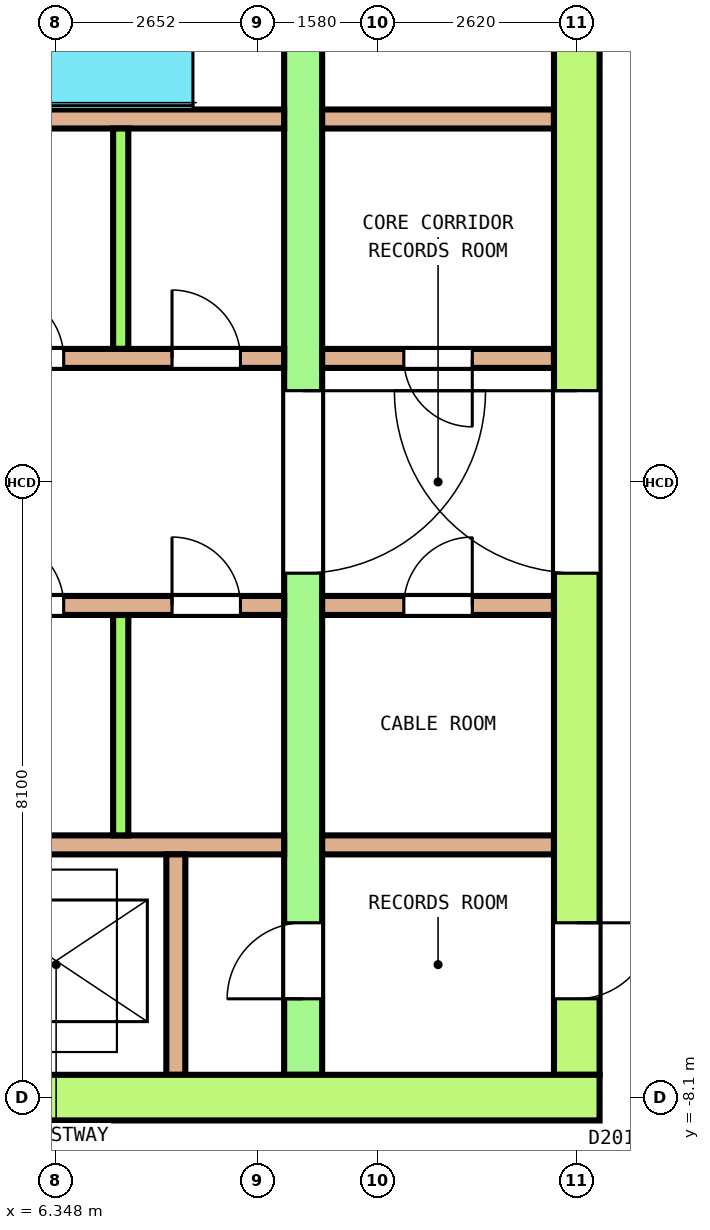
"""IFC4 building model, lengths in metres.
Left out: names, types, materials, properties, quantities, classifications, styles, units other than length and angle.
Written with IfcOpenShell. Run it as: python <this file> out.ifc"""

import sys

from ifc_helpers import new_model, si_unit, direction, frame, frame_2d, origin, place, context, subcontext, project, spatial, polyline, rectangle, outline, extrude, element, fill, save


model = new_model("IFC4")
c1 = context("Model", 3, precision=1e-05, world=origin(), true_north=direction((0.0, 1.0)))
c2 = subcontext(c1, "Body", "Model", "MODEL_VIEW")
j1 = project(units=[si_unit("LENGTHUNIT", "METRE"), si_unit("PLANEANGLEUNIT", "RADIAN")], contexts=[c1])
p1 = place(None, origin())
s1 = spatial("IfcSite", under=j1, at=p1, CompositionType="ELEMENT")
p2 = place(p1, origin())
s2 = spatial("IfcBuilding", under=s1, at=p2, CompositionType="ELEMENT")
p3 = place(p2, frame((0.0, 0.0, 237.4)))
s3 = spatial("IfcBuildingStorey", under=s2, at=p3, CompositionType="ELEMENT", Elevation=237.4)
p4 = place(p3, frame((13.66, -19.141, 0.0), z_axis=(0.0, 0.0, 1.0), x_axis=(0.500001086243, 0.866024776641, 0.0)))
e1 = element("IfcWall", 1, at=p4, inside=s3, PredefinedType="SOLIDWALL", context=c2, shape_type="SweptSolid", body=[
    extrude(outline(polyline([(-0.027, -0.1), (1.002, -0.1), (2.031, -0.1), (3.059, -0.1), (4.088, -0.1), (5.117, -0.1), (6.146, -0.1), (7.175, -0.1), (8.203, -0.1), (9.232, -0.1), (10.261, -0.1), (11.29, -0.1), (12.318, -0.1), (13.347, -0.1), (14.376, -0.1), (15.405, -0.1), (16.433, -0.1), (17.462, -0.1), (18.491, -0.1), (19.52, -0.1), (19.466, 0.1), (18.443, 0.1), (17.42, 0.1), (16.396, 0.1), (15.373, 0.1), (14.35, 0.1), (13.327, 0.1), (12.304, 0.1), (11.281, 0.1), (10.258, 0.1), (9.235, 0.1), (8.212, 0.1), (7.188, 0.1), (6.166, 0.1), (5.142, 0.1), (4.119, 0.1), (3.096, 0.1), (2.073, 0.1), (1.05, 0.1), (0.027, 0.1), (-0.027, -0.1)])), origin(), (0.0, 0.0, 1.0), 3.7),
])
p5 = place(p4, frame((0.499, 0.0, 0.1)))
e2 = element("IfcOpeningElement", 2, at=p5, cuts=e1, PredefinedType="OPENING", context=c2, shape_type="SweptSolid", body=[
    extrude(rectangle(XDim=2.9, YDim=2.65, at=frame_2d((1.45, 1.325))), frame((0.0, 0.11, 0.0), z_axis=(0.0, -1.0, 0.0), x_axis=(1.0, 0.0, 0.0)), (0.0, 0.0, 1.0), 0.22),
])
p6 = place(p4, frame((4.398, 0.0, 0.1)))
e3 = element("IfcOpeningElement", 3, at=p6, cuts=e1, PredefinedType="OPENING", context=c2, shape_type="SweptSolid", body=[
    extrude(rectangle(XDim=2.9, YDim=2.65, at=frame_2d((1.45, 1.325))), frame((0.0, 0.11, 0.0), z_axis=(0.0, -1.0, 0.0), x_axis=(1.0, 0.0, 0.0)), (0.0, 0.0, 1.0), 0.22),
])
p7 = place(p4, frame((8.846, 0.0, 0.0)))
e4 = element("IfcOpeningElement", 4, at=p7, cuts=e1, PredefinedType="OPENING", context=c2, shape_type="SweptSolid", body=[
    extrude(rectangle(XDim=1.8, YDim=2.4, at=frame_2d((0.9, 1.2))), frame((0.0, 0.11, 0.0), z_axis=(0.0, -1.0, 0.0), x_axis=(1.0, 0.0, 0.0)), (0.0, 0.0, 1.0), 0.22),
])
p8 = place(p4, frame((8.846, 0.0, 2.55)))
e5 = element("IfcOpeningElement", 5, at=p8, cuts=e1, PredefinedType="OPENING", context=c2, shape_type="SweptSolid", body=[
    extrude(rectangle(XDim=1.8, YDim=0.2, at=frame_2d((0.9, 0.1))), frame((0.0, 0.11, 0.0), z_axis=(0.0, -1.0, 0.0), x_axis=(1.0, 0.0, 0.0)), (0.0, 0.0, 1.0), 0.22),
])
p9 = place(p4, frame((12.195, 0.0, 0.1)))
e6 = element("IfcOpeningElement", 6, at=p9, cuts=e1, PredefinedType="OPENING", context=c2, shape_type="SweptSolid", body=[
    extrude(rectangle(XDim=2.9, YDim=2.65, at=frame_2d((1.45, 1.325))), frame((0.0, 0.11, 0.0), z_axis=(0.0, -1.0, 0.0), x_axis=(1.0, 0.0, 0.0)), (0.0, 0.0, 1.0), 0.22),
])
p10 = place(p4, frame((16.094, 0.0, 0.1)))
e7 = element("IfcOpeningElement", 7, at=p10, cuts=e1, PredefinedType="OPENING", context=c2, shape_type="SweptSolid", body=[
    extrude(rectangle(XDim=2.9, YDim=2.65, at=frame_2d((1.45, 1.325))), frame((0.0, 0.11, 0.0), z_axis=(0.0, -1.0, 0.0), x_axis=(1.0, 0.0, 0.0)), (0.0, 0.0, 1.0), 0.22),
])
p11 = place(p3, frame((-13.5, -8.1, 0.0), z_axis=(0.0, 0.0, 1.0), x_axis=(1.0, 0.0, 0.0)))
e8 = element("IfcWall", 8, at=p11, inside=s3, PredefinedType="SHEAR", context=c2, shape_type="SweptSolid", body=[
    extrude(rectangle(XDim=27.0, YDim=0.6, at=frame_2d((13.5, 0.0))), origin(), (0.0, 0.0, 1.0), 3.7),
])
p12 = place(p11, frame((15.05, 0.0, 0.0)))
e9 = element("IfcOpeningElement", 9, at=p12, cuts=e8, PredefinedType="OPENING", context=c2, shape_type="SweptSolid", body=[
    extrude(rectangle(XDim=1.2, YDim=2.1, at=frame_2d((0.6, 1.05))), frame((0.0, 0.31, 0.0), z_axis=(0.0, -1.0, 0.0), x_axis=(1.0, 0.0, 0.0)), (0.0, 0.0, 1.0), 0.62),
])
p13 = place(p3, frame((13.2, -7.8, 0.0), z_axis=(0.0, 0.0, 1.0), x_axis=(0.0, 1.0, 0.0)))
e10 = element("IfcWall", 10, at=p13, inside=s3, PredefinedType="SHEAR", context=c2, shape_type="SweptSolid", body=[
    extrude(rectangle(XDim=15.6, YDim=0.6, at=frame_2d((7.8, 0.0))), origin(), (0.0, 0.0, 1.0), 3.7),
])
p14 = place(p13, frame((6.6, 0.0, 0.0)))
e11 = element("IfcOpeningElement", 11, at=p14, cuts=e10, PredefinedType="OPENING", context=c2, shape_type="SweptSolid", body=[
    extrude(rectangle(XDim=2.4, YDim=2.1, at=frame_2d((1.2, 1.05))), frame((0.0, 0.31, 0.0), z_axis=(0.0, -1.0, 0.0), x_axis=(1.0, 0.0, 0.0)), (0.0, 0.0, 1.0), 0.62),
])
p15 = place(p13, frame((13.5, 0.0, 0.0)))
e12 = element("IfcOpeningElement", 12, at=p15, cuts=e10, PredefinedType="OPENING", context=c2, shape_type="SweptSolid", body=[
    extrude(rectangle(XDim=1.2, YDim=2.1, at=frame_2d((0.6, 1.05))), frame((0.0, 0.31, 0.0), z_axis=(0.0, -1.0, 0.0), x_axis=(1.0, 0.0, 0.0)), (0.0, 0.0, 1.0), 0.62),
])
p16 = place(p13, frame((1.0, 0.0, 0.0)))
e13 = element("IfcOpeningElement", 13, at=p16, cuts=e10, PredefinedType="OPENING", context=c2, shape_type="SweptSolid", body=[
    extrude(rectangle(XDim=1.0, YDim=2.1, at=frame_2d((0.5, 1.05))), frame((0.0, 0.31, 0.0), z_axis=(0.0, -1.0, 0.0), x_axis=(1.0, 0.0, 0.0)), (0.0, 0.0, 1.0), 0.62),
])
p17 = place(p3, frame((9.6, -7.8, 0.0), z_axis=(0.0, 0.0, 1.0), x_axis=(0.0, 1.0, 0.0)))
e14 = element("IfcWall", 14, at=p17, inside=s3, PredefinedType="SHEAR", context=c2, shape_type="SweptSolid", body=[
    extrude(rectangle(XDim=15.6, YDim=0.5, at=frame_2d((7.8, 0.0))), origin(), (0.0, 0.0, 1.0), 3.7),
])
p18 = place(p17, frame((6.6, 0.0, 0.0)))
e15 = element("IfcOpeningElement", 15, at=p18, cuts=e14, PredefinedType="OPENING", context=c2, shape_type="SweptSolid", body=[
    extrude(rectangle(XDim=2.4, YDim=2.1, at=frame_2d((1.2, 1.05))), frame((0.0, 0.26, 0.0), z_axis=(0.0, -1.0, 0.0), x_axis=(1.0, 0.0, 0.0)), (0.0, 0.0, 1.0), 0.52),
])
p19 = place(p17, frame((13.5, 0.0, 0.0)))
e16 = element("IfcOpeningElement", 16, at=p19, cuts=e14, PredefinedType="OPENING", context=c2, shape_type="SweptSolid", body=[
    extrude(rectangle(XDim=1.2, YDim=2.1, at=frame_2d((0.6, 1.05))), frame((0.0, 0.26, 0.0), z_axis=(0.0, -1.0, 0.0), x_axis=(1.0, 0.0, 0.0)), (0.0, 0.0, 1.0), 0.52),
])
p20 = place(p17, frame((1.0, 0.0, 0.0)))
e17 = element("IfcOpeningElement", 17, at=p20, cuts=e14, PredefinedType="OPENING", context=c2, shape_type="SweptSolid", body=[
    extrude(rectangle(XDim=1.0, YDim=2.1, at=frame_2d((0.5, 1.05))), frame((0.0, 0.26, 0.0), z_axis=(0.0, -1.0, 0.0), x_axis=(1.0, 0.0, 0.0)), (0.0, 0.0, 1.0), 0.52),
])
p21 = place(p3, frame((-9.35, 1.625, 0.0), z_axis=(0.0, 0.0, 1.0), x_axis=(1.0, 0.0, 0.0)))
e18 = element("IfcWall", 18, at=p21, inside=s3, PredefinedType="SOLIDWALL", context=c2, shape_type="SweptSolid", body=[
    extrude(rectangle(XDim=18.7, YDim=0.25, at=frame_2d((9.35, 0.0))), origin(), (0.0, 0.0, 1.0), 3.7),
])
p22 = place(p21, frame((7.65, 0.0, 0.0)))
e19 = element("IfcOpeningElement", 19, at=p22, cuts=e18, PredefinedType="OPENING", context=c2, shape_type="SweptSolid", body=[
    extrude(rectangle(XDim=1.1, YDim=2.1, at=frame_2d((0.55, 1.05))), frame((0.0, 0.135, 0.0), z_axis=(0.0, -1.0, 0.0), x_axis=(1.0, 0.0, 0.0)), (0.0, 0.0, 1.0), 0.27),
])
p23 = place(p21, frame((9.95, 0.0, 0.0)))
e20 = element("IfcOpeningElement", 20, at=p23, cuts=e18, PredefinedType="OPENING", context=c2, shape_type="SweptSolid", body=[
    extrude(rectangle(XDim=1.1, YDim=2.1, at=frame_2d((0.55, 1.05))), frame((0.0, 0.135, 0.0), z_axis=(0.0, -1.0, 0.0), x_axis=(1.0, 0.0, 0.0)), (0.0, 0.0, 1.0), 0.27),
])
p24 = place(p21, frame((12.4, 0.0, 0.0)))
e21 = element("IfcOpeningElement", 21, at=p24, cuts=e18, PredefinedType="OPENING", context=c2, shape_type="SweptSolid", body=[
    extrude(rectangle(XDim=1.1, YDim=2.1, at=frame_2d((0.55, 1.05))), frame((0.0, 0.135, 0.0), z_axis=(0.0, -1.0, 0.0), x_axis=(1.0, 0.0, 0.0)), (0.0, 0.0, 1.0), 0.27),
])
p25 = place(p21, frame((0.575, 0.0, 0.0)))
e22 = element("IfcOpeningElement", 22, at=p25, cuts=e18, PredefinedType="OPENING", context=c2, shape_type="SweptSolid", body=[
    extrude(rectangle(XDim=0.9, YDim=2.1, at=frame_2d((0.45, 1.05))), frame((0.0, 0.135, 0.0), z_axis=(0.0, -1.0, 0.0), x_axis=(1.0, 0.0, 0.0)), (0.0, 0.0, 1.0), 0.27),
])
p26 = place(p21, frame((2.919, 0.0, 0.0)))
e23 = element("IfcOpeningElement", 23, at=p26, cuts=e18, PredefinedType="OPENING", context=c2, shape_type="SweptSolid", body=[
    extrude(rectangle(XDim=0.9, YDim=2.1, at=frame_2d((0.45, 1.05))), frame((0.0, 0.135, 0.0), z_axis=(0.0, -1.0, 0.0), x_axis=(1.0, 0.0, 0.0)), (0.0, 0.0, 1.0), 0.27),
])
p27 = place(p21, frame((5.281, 0.0, 0.0)))
e24 = element("IfcOpeningElement", 24, at=p27, cuts=e18, PredefinedType="OPENING", context=c2, shape_type="SweptSolid", body=[
    extrude(rectangle(XDim=0.9, YDim=2.1, at=frame_2d((0.45, 1.05))), frame((0.0, 0.135, 0.0), z_axis=(0.0, -1.0, 0.0), x_axis=(1.0, 0.0, 0.0)), (0.0, 0.0, 1.0), 0.27),
])
p28 = place(p21, frame((14.9, 0.0, 0.0)))
e25 = element("IfcOpeningElement", 25, at=p28, cuts=e18, PredefinedType="OPENING", context=c2, shape_type="SweptSolid", body=[
    extrude(rectangle(XDim=0.9, YDim=2.1, at=frame_2d((0.45, 1.05))), frame((0.0, 0.135, 0.0), z_axis=(0.0, -1.0, 0.0), x_axis=(1.0, 0.0, 0.0)), (0.0, 0.0, 1.0), 0.27),
])
p29 = place(p21, frame((17.225, 0.0, 0.0)))
e26 = element("IfcOpeningElement", 26, at=p29, cuts=e18, PredefinedType="OPENING", context=c2, shape_type="SweptSolid", body=[
    extrude(rectangle(XDim=0.9, YDim=2.1, at=frame_2d((0.45, 1.05))), frame((0.0, 0.135, 0.0), z_axis=(0.0, -1.0, 0.0), x_axis=(1.0, 0.0, 0.0)), (0.0, 0.0, 1.0), 0.27),
])
p30 = place(p3, frame((9.85, 1.625, 0.0), z_axis=(0.0, 0.0, 1.0), x_axis=(1.0, 0.0, 0.0)))
e27 = element("IfcWall", 27, at=p30, inside=s3, PredefinedType="SOLIDWALL", context=c2, shape_type="SweptSolid", body=[
    extrude(rectangle(XDim=3.05, YDim=0.25, at=frame_2d((1.525, 0.0))), origin(), (0.0, 0.0, 1.0), 3.7),
])
p31 = place(p30, frame((1.075, 0.0, 0.0)))
e28 = element("IfcOpeningElement", 28, at=p31, cuts=e27, PredefinedType="OPENING", context=c2, shape_type="SweptSolid", body=[
    extrude(rectangle(XDim=0.9, YDim=2.1, at=frame_2d((0.45, 1.05))), frame((0.0, 0.135, 0.0), z_axis=(0.0, -1.0, 0.0), x_axis=(1.0, 0.0, 0.0)), (0.0, 0.0, 1.0), 0.27),
])
p32 = place(p3, frame((-9.35, 4.775, 0.0), z_axis=(0.0, 0.0, 1.0), x_axis=(1.0, 0.0, 0.0)))
e29 = element("IfcWall", 29, at=p32, inside=s3, PredefinedType="SOLIDWALL", context=c2, shape_type="SweptSolid", body=[
    extrude(rectangle(XDim=18.7, YDim=0.25, at=frame_2d((9.35, 0.0))), origin(), (0.0, 0.0, 1.0), 3.7),
])
p33 = place(p3, frame((9.85, 4.775, 0.0), z_axis=(0.0, 0.0, 1.0), x_axis=(1.0, 0.0, 0.0)))
e30 = element("IfcWall", 30, at=p33, inside=s3, PredefinedType="SOLIDWALL", context=c2, shape_type="SweptSolid", body=[
    extrude(rectangle(XDim=3.05, YDim=0.25, at=frame_2d((1.525, 0.0))), origin(), (0.0, 0.0, 1.0), 3.7),
])
p34 = place(p3, frame((7.2, 1.75, 0.0), z_axis=(0.0, 0.0, 1.0), x_axis=(0.0, 1.0, 0.0)))
e31 = element("IfcWall", 31, at=p34, inside=s3, PredefinedType="SOLIDWALL", context=c2, shape_type="SweptSolid", body=[
    extrude(rectangle(XDim=2.9, YDim=0.2, at=frame_2d((1.45, 0.0))), origin(), (0.0, 0.0, 1.0), 3.7),
])
p35 = place(p3, frame((-9.35, -1.625, 0.0), z_axis=(0.0, 0.0, 1.0), x_axis=(1.0, 0.0, 0.0)))
e32 = element("IfcWall", 32, at=p35, inside=s3, PredefinedType="SOLIDWALL", context=c2, shape_type="SweptSolid", body=[
    extrude(rectangle(XDim=18.7, YDim=0.25, at=frame_2d((9.35, 0.0))), origin(), (0.0, 0.0, 1.0), 3.7),
])
p36 = place(p35, frame((7.65, 0.0, 0.0)))
e33 = element("IfcOpeningElement", 33, at=p36, cuts=e32, PredefinedType="OPENING", context=c2, shape_type="SweptSolid", body=[
    extrude(rectangle(XDim=1.1, YDim=2.1, at=frame_2d((0.55, 1.05))), frame((0.0, 0.135, 0.0), z_axis=(0.0, -1.0, 0.0), x_axis=(1.0, 0.0, 0.0)), (0.0, 0.0, 1.0), 0.27),
])
p37 = place(p35, frame((9.95, 0.0, 0.0)))
e34 = element("IfcOpeningElement", 34, at=p37, cuts=e32, PredefinedType="OPENING", context=c2, shape_type="SweptSolid", body=[
    extrude(rectangle(XDim=1.1, YDim=2.1, at=frame_2d((0.55, 1.05))), frame((0.0, 0.135, 0.0), z_axis=(0.0, -1.0, 0.0), x_axis=(1.0, 0.0, 0.0)), (0.0, 0.0, 1.0), 0.27),
])
p38 = place(p35, frame((12.4, 0.0, 0.0)))
e35 = element("IfcOpeningElement", 35, at=p38, cuts=e32, PredefinedType="OPENING", context=c2, shape_type="SweptSolid", body=[
    extrude(rectangle(XDim=1.1, YDim=2.1, at=frame_2d((0.55, 1.05))), frame((0.0, 0.135, 0.0), z_axis=(0.0, -1.0, 0.0), x_axis=(1.0, 0.0, 0.0)), (0.0, 0.0, 1.0), 0.27),
])
p39 = place(p35, frame((0.575, 0.0, 0.0)))
e36 = element("IfcOpeningElement", 36, at=p39, cuts=e32, PredefinedType="OPENING", context=c2, shape_type="SweptSolid", body=[
    extrude(rectangle(XDim=0.9, YDim=2.1, at=frame_2d((0.45, 1.05))), frame((0.0, 0.135, 0.0), z_axis=(0.0, -1.0, 0.0), x_axis=(1.0, 0.0, 0.0)), (0.0, 0.0, 1.0), 0.27),
])
p40 = place(p35, frame((2.519, 0.0, 0.0)))
e37 = element("IfcOpeningElement", 37, at=p40, cuts=e32, PredefinedType="OPENING", context=c2, shape_type="SweptSolid", body=[
    extrude(rectangle(XDim=0.9, YDim=2.1, at=frame_2d((0.45, 1.05))), frame((0.0, 0.135, 0.0), z_axis=(0.0, -1.0, 0.0), x_axis=(1.0, 0.0, 0.0)), (0.0, 0.0, 1.0), 0.27),
])
p41 = place(p35, frame((4.881, 0.0, 0.0)))
e38 = element("IfcOpeningElement", 38, at=p41, cuts=e32, PredefinedType="OPENING", context=c2, shape_type="SweptSolid", body=[
    extrude(rectangle(XDim=0.9, YDim=2.1, at=frame_2d((0.45, 1.05))), frame((0.0, 0.135, 0.0), z_axis=(0.0, -1.0, 0.0), x_axis=(1.0, 0.0, 0.0)), (0.0, 0.0, 1.0), 0.27),
])
p42 = place(p35, frame((14.9, 0.0, 0.0)))
e39 = element("IfcOpeningElement", 39, at=p42, cuts=e32, PredefinedType="OPENING", context=c2, shape_type="SweptSolid", body=[
    extrude(rectangle(XDim=0.9, YDim=2.1, at=frame_2d((0.45, 1.05))), frame((0.0, 0.135, 0.0), z_axis=(0.0, -1.0, 0.0), x_axis=(1.0, 0.0, 0.0)), (0.0, 0.0, 1.0), 0.27),
])
p43 = place(p35, frame((17.225, 0.0, 0.0)))
e40 = element("IfcOpeningElement", 40, at=p43, cuts=e32, PredefinedType="OPENING", context=c2, shape_type="SweptSolid", body=[
    extrude(rectangle(XDim=0.9, YDim=2.1, at=frame_2d((0.45, 1.05))), frame((0.0, 0.135, 0.0), z_axis=(0.0, -1.0, 0.0), x_axis=(1.0, 0.0, 0.0)), (0.0, 0.0, 1.0), 0.27),
])
p44 = place(p3, frame((9.85, -1.625, 0.0), z_axis=(0.0, 0.0, 1.0), x_axis=(1.0, 0.0, 0.0)))
e41 = element("IfcWall", 41, at=p44, inside=s3, PredefinedType="SOLIDWALL", context=c2, shape_type="SweptSolid", body=[
    extrude(rectangle(XDim=3.05, YDim=0.25, at=frame_2d((1.525, 0.0))), origin(), (0.0, 0.0, 1.0), 3.7),
])
p45 = place(p44, frame((1.075, 0.0, 0.0)))
e42 = element("IfcOpeningElement", 42, at=p45, cuts=e41, PredefinedType="OPENING", context=c2, shape_type="SweptSolid", body=[
    extrude(rectangle(XDim=0.9, YDim=2.1, at=frame_2d((0.45, 1.05))), frame((0.0, 0.135, 0.0), z_axis=(0.0, -1.0, 0.0), x_axis=(1.0, 0.0, 0.0)), (0.0, 0.0, 1.0), 0.27),
])
p46 = place(p3, frame((-9.35, -4.775, 0.0), z_axis=(0.0, 0.0, 1.0), x_axis=(1.0, 0.0, 0.0)))
e43 = element("IfcWall", 43, at=p46, inside=s3, PredefinedType="SOLIDWALL", context=c2, shape_type="SweptSolid", body=[
    extrude(rectangle(XDim=18.7, YDim=0.25, at=frame_2d((9.35, 0.0))), origin(), (0.0, 0.0, 1.0), 3.7),
])
p47 = place(p3, frame((9.85, -4.775, 0.0), z_axis=(0.0, 0.0, 1.0), x_axis=(1.0, 0.0, 0.0)))
e44 = element("IfcWall", 44, at=p47, inside=s3, PredefinedType="SOLIDWALL", context=c2, shape_type="SweptSolid", body=[
    extrude(rectangle(XDim=3.05, YDim=0.25, at=frame_2d((1.525, 0.0))), origin(), (0.0, 0.0, 1.0), 3.7),
])
p48 = place(p3, frame((7.2, -4.65, 0.0), z_axis=(0.0, 0.0, 1.0), x_axis=(0.0, 1.0, 0.0)))
e45 = element("IfcWall", 45, at=p48, inside=s3, PredefinedType="SOLIDWALL", context=c2, shape_type="SweptSolid", body=[
    extrude(rectangle(XDim=2.9, YDim=0.2, at=frame_2d((1.45, 0.0))), origin(), (0.0, 0.0, 1.0), 3.7),
])
p49 = place(p3, frame((7.925, -7.8, 0.0), z_axis=(0.0, 0.0, 1.0), x_axis=(0.0, 1.0, 0.0)))
e46 = element("IfcWall", 46, at=p49, inside=s3, PredefinedType="SOLIDWALL", context=c2, shape_type="SweptSolid", body=[
    extrude(rectangle(XDim=2.9, YDim=0.25, at=frame_2d((1.45, 0.0))), origin(), (0.0, 0.0, 1.0), 3.7),
])
p50 = place(p18, origin())
e47 = element("IfcDoor", 47, at=p50, inside=s3, OperationType="DOUBLE_DOOR_SINGLE_SWING", PredefinedType="DOOR", context=c2, shape_type="SweptSolid", body=[
    extrude(rectangle(XDim=2.4, YDim=2.1, at=frame_2d((1.2, 1.05))), frame((0.0, 0.2, 0.0), z_axis=(0.0, -1.0, 0.0), x_axis=(1.0, 0.0, 0.0)), (0.0, 0.0, 1.0), 0.4),
])
fill(e15, e47)
p51 = place(p14, origin())
e48 = element("IfcDoor", 48, at=p51, inside=s3, OperationType="DOUBLE_DOOR_SINGLE_SWING", PredefinedType="DOOR", context=c2, shape_type="SweptSolid", body=[
    extrude(rectangle(XDim=2.4, YDim=2.1, at=frame_2d((1.2, 1.05))), frame((0.0, 0.25, 0.0), z_axis=(0.0, -1.0, 0.0), x_axis=(1.0, 0.0, 0.0)), (0.0, 0.0, 1.0), 0.5),
])
fill(e11, e48)
p52 = place(p20, origin())
e49 = element("IfcDoor", 49, at=p52, inside=s3, OperationType="SINGLE_SWING_RIGHT", PredefinedType="DOOR", context=c2, shape_type="SweptSolid", body=[
    extrude(rectangle(XDim=1.0, YDim=2.1, at=frame_2d((0.5, 1.05))), frame((0.0, 0.2, 0.0), z_axis=(0.0, -1.0, 0.0), x_axis=(1.0, 0.0, 0.0)), (0.0, 0.0, 1.0), 0.4),
])
fill(e17, e49)
p53 = place(p16, origin())
e50 = element("IfcDoor", 50, at=p53, inside=s3, OperationType="SINGLE_SWING_LEFT", PredefinedType="DOOR", context=c2, shape_type="SweptSolid", body=[
    extrude(rectangle(XDim=1.0, YDim=2.1, at=frame_2d((0.5, 1.05))), frame((0.0, 0.25, 0.0), z_axis=(0.0, -1.0, 0.0), x_axis=(1.0, 0.0, 0.0)), (0.0, 0.0, 1.0), 0.5),
])
fill(e13, e50)
p54 = place(p28, origin())
e51 = element("IfcDoor", 51, at=p54, inside=s3, OperationType="SINGLE_SWING_RIGHT", PredefinedType="DOOR", context=c2, shape_type="SweptSolid", body=[
    extrude(rectangle(XDim=0.9, YDim=2.1, at=frame_2d((0.45, 1.05))), frame((0.0, 0.075, 0.0), z_axis=(0.0, -1.0, 0.0), x_axis=(1.0, 0.0, 0.0)), (0.0, 0.0, 1.0), 0.15),
])
fill(e25, e51)
p55 = place(p29, origin())
e52 = element("IfcDoor", 52, at=p55, inside=s3, OperationType="SINGLE_SWING_LEFT", PredefinedType="DOOR", context=c2, shape_type="SweptSolid", body=[
    extrude(rectangle(XDim=0.9, YDim=2.1, at=frame_2d((0.45, 1.05))), frame((0.0, 0.075, 0.0), z_axis=(0.0, -1.0, 0.0), x_axis=(1.0, 0.0, 0.0)), (0.0, 0.0, 1.0), 0.15),
])
fill(e26, e52)
p56 = place(p31, origin())
e53 = element("IfcDoor", 53, at=p56, inside=s3, OperationType="SINGLE_SWING_RIGHT", PredefinedType="DOOR", context=c2, shape_type="SweptSolid", body=[
    extrude(rectangle(XDim=0.9, YDim=2.1, at=frame_2d((0.45, 1.05))), frame((0.0, 0.075, 0.0), z_axis=(0.0, -1.0, 0.0), x_axis=(1.0, 0.0, 0.0)), (0.0, 0.0, 1.0), 0.15),
])
fill(e28, e53)
p57 = place(p42, origin())
e54 = element("IfcDoor", 54, at=p57, inside=s3, OperationType="SINGLE_SWING_LEFT", PredefinedType="DOOR", context=c2, shape_type="SweptSolid", body=[
    extrude(rectangle(XDim=0.9, YDim=2.1, at=frame_2d((0.45, 1.05))), frame((0.0, 0.075, 0.0), z_axis=(0.0, -1.0, 0.0), x_axis=(1.0, 0.0, 0.0)), (0.0, 0.0, 1.0), 0.15),
])
fill(e39, e54)
p58 = place(p43, origin())
e55 = element("IfcDoor", 55, at=p58, inside=s3, OperationType="SINGLE_SWING_RIGHT", PredefinedType="DOOR", context=c2, shape_type="SweptSolid", body=[
    extrude(rectangle(XDim=0.9, YDim=2.1, at=frame_2d((0.45, 1.05))), frame((0.0, 0.075, 0.0), z_axis=(0.0, -1.0, 0.0), x_axis=(1.0, 0.0, 0.0)), (0.0, 0.0, 1.0), 0.15),
])
fill(e40, e55)
p59 = place(p45, origin())
e56 = element("IfcDoor", 56, at=p59, inside=s3, OperationType="SINGLE_SWING_LEFT", PredefinedType="DOOR", context=c2, shape_type="SweptSolid", body=[
    extrude(rectangle(XDim=0.9, YDim=2.1, at=frame_2d((0.45, 1.05))), frame((0.0, 0.075, 0.0), z_axis=(0.0, -1.0, 0.0), x_axis=(1.0, 0.0, 0.0)), (0.0, 0.0, 1.0), 0.15),
])
fill(e42, e56)
save(model, sys.argv[1])
